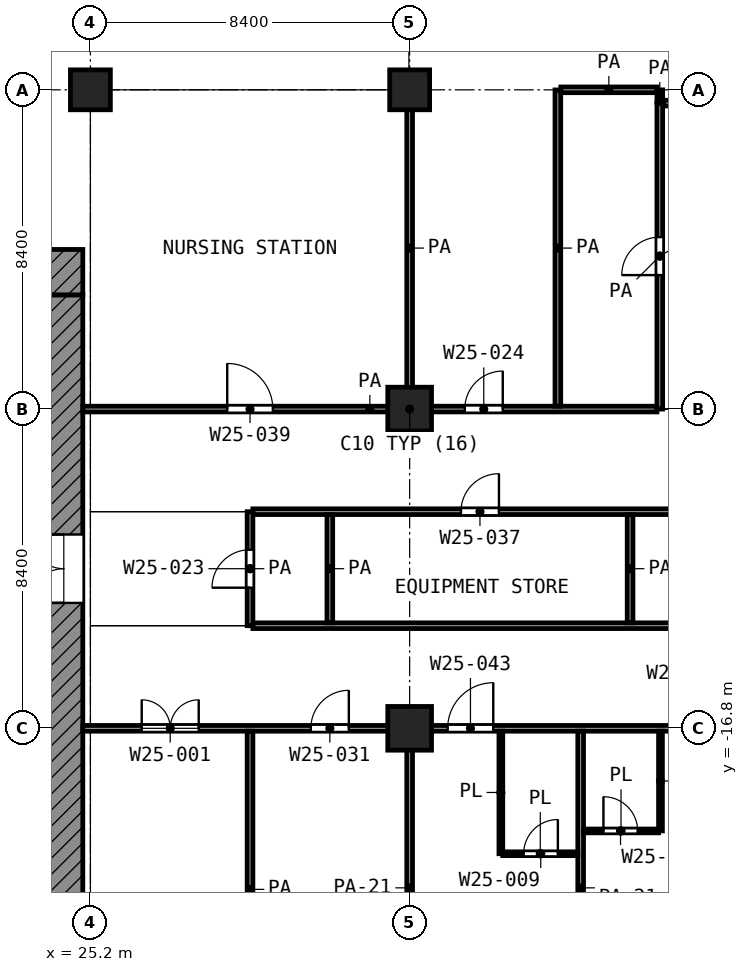
"""IFC4 building model, lengths in metres.
Left out: names, types, materials, properties, quantities, classifications, styles, units other than length and angle.
Written with IfcOpenShell. Run it as: python <this file> out.ifc"""

import sys

from ifc_helpers import new_model, si_unit, direction, frame, frame_2d, origin, origin_2d, place, context, subcontext, project, spatial, rectangle, extrude, element, fill, save


model = new_model("IFC4")
c1 = context("Model", 3, precision=1e-05, world=origin(), true_north=direction((0.0, 1.0)))
c2 = subcontext(c1, "Body", "Model", "MODEL_VIEW")
j1 = project(units=[si_unit("LENGTHUNIT", "METRE"), si_unit("PLANEANGLEUNIT", "RADIAN")], contexts=[c1])
p1 = place(None, origin())
s1 = spatial("IfcSite", under=j1, at=p1, CompositionType="ELEMENT")
p2 = place(p1, origin())
s2 = spatial("IfcBuilding", under=s1, at=p2, CompositionType="ELEMENT")
p3 = place(p2, frame((0.0, 0.0, 132.4)))
s3 = spatial("IfcBuildingStorey", under=s2, at=p3, CompositionType="ELEMENT", Elevation=132.4)
for number, where, z_axis, x_axis in (
    (1, (25.2, 0.0, 0.0), (0.0, 0.0, 1.0), (1.0, 0.0, 0.0)),
    (2, (33.6, 0.0, 0.0), (0.0, 0.0, 1.0), (1.0, 0.0, 0.0)),
):
    element("IfcColumn", number, at=place(p3, frame(where, z_axis=z_axis, x_axis=x_axis)), inside=s3, PredefinedType="COLUMN", context=c2, shape_type="SweptSolid", body=[
        extrude(rectangle(XDim=1.05, YDim=1.05, at=origin_2d()), origin(), (0.0, 0.0, 1.0), 4.2),
    ])
for number, where, z_axis, x_axis in (
    (3, (33.6, -8.4, 0.0), (0.0, 0.0, 1.0), (1.0, 0.0, 0.0)),
    (4, (33.6, -16.8, 0.0), (0.0, 0.0, 1.0), (1.0, 0.0, 0.0)),
):
    element("IfcColumn", number, at=place(p3, frame(where, z_axis=z_axis, x_axis=x_axis)), inside=s3, PredefinedType="COLUMN", context=c2, shape_type="SweptSolid", body=[
        extrude(rectangle(XDim=1.15, YDim=1.15, at=origin_2d()), origin(), (0.0, 0.0, 1.0), 4.2),
    ])
p4 = place(p3, frame((4.2, -4.8, 0.0), z_axis=(0.0, 0.0, 1.0), x_axis=(1.0, 0.0, 0.0)))
e5 = element("IfcWall", 5, at=p4, inside=s3, PredefinedType="SHEAR", context=c2, shape_type="SweptSolid", body=[
    extrude(rectangle(XDim=20.8, YDim=1.2, at=frame_2d((10.4, 0.0))), origin(), (0.0, 0.0, 1.0), 3.6),
])
p5 = place(p4, frame((1.95, 0.0, 0.0)))
e6 = element("IfcOpeningElement", 6, at=p5, cuts=e5, PredefinedType="OPENING", context=c2, shape_type="SweptSolid", body=[
    extrude(rectangle(XDim=1.1, YDim=2.1, at=frame_2d((0.55, 1.05))), frame((0.0, 0.61, 0.0), z_axis=(0.0, -1.0, 0.0), x_axis=(1.0, 0.0, 0.0)), (0.0, 0.0, 1.0), 1.22),
])
p6 = place(p4, frame((17.95, 0.0, 0.0)))
e7 = element("IfcOpeningElement", 7, at=p6, cuts=e5, PredefinedType="OPENING", context=c2, shape_type="SweptSolid", body=[
    extrude(rectangle(XDim=1.1, YDim=2.1, at=frame_2d((0.55, 1.05))), frame((0.0, 0.61, 0.0), z_axis=(0.0, -1.0, 0.0), x_axis=(1.0, 0.0, 0.0)), (0.0, 0.0, 1.0), 1.22),
])
p7 = place(p3, frame((24.5, -24.0, 0.0), z_axis=(0.0, 0.0, 1.0), x_axis=(0.0, 1.0, 0.0)))
e8 = element("IfcWall", 8, at=p7, inside=s3, PredefinedType="SHEAR", context=c2, shape_type="SweptSolid", body=[
    extrude(rectangle(XDim=18.6, YDim=1.0, at=frame_2d((9.3, 0.0))), origin(), (0.0, 0.0, 1.0), 3.6),
])
p8 = place(p7, frame((10.5, 0.0, 0.0)))
e9 = element("IfcOpeningElement", 9, at=p8, cuts=e8, PredefinedType="OPENING", context=c2, shape_type="SweptSolid", body=[
    extrude(rectangle(XDim=1.8, YDim=2.1, at=frame_2d((0.9, 1.05))), frame((0.0, 0.51, 0.0), z_axis=(0.0, -1.0, 0.0), x_axis=(1.0, 0.0, 0.0)), (0.0, 0.0, 1.0), 1.02),
])
p9 = place(p3, frame((36.05, -20.1, 0.0), z_axis=(0.0, 0.0, 1.0), x_axis=(1.0, 0.0, 0.0)))
e10 = element("IfcWall", 10, at=p9, inside=s3, PredefinedType="PARTITIONING", context=c2, shape_type="SweptSolid", body=[
    extrude(rectangle(XDim=1.975, YDim=0.1, at=frame_2d((0.987, 0.0))), origin(), (0.0, 0.0, 1.0), 3.6),
])
p10 = place(p9, frame((0.55, 0.0, 0.0)))
e11 = element("IfcOpeningElement", 11, at=p10, cuts=e10, PredefinedType="OPENING", context=c2, shape_type="SweptSolid", body=[
    extrude(rectangle(XDim=0.9, YDim=2.1, at=frame_2d((0.45, 1.05))), frame((0.0, 0.06, 0.0), z_axis=(0.0, -1.0, 0.0), x_axis=(1.0, 0.0, 0.0)), (0.0, 0.0, 1.0), 0.12),
])
p11 = place(p3, frame((38.175, -19.5, 0.0), z_axis=(0.0, 0.0, 1.0), x_axis=(1.0, 0.0, 0.0)))
e12 = element("IfcWall", 12, at=p11, inside=s3, PredefinedType="PARTITIONING", context=c2, shape_type="SweptSolid", body=[
    extrude(rectangle(XDim=1.973, YDim=0.1, at=frame_2d((0.986, 0.0))), origin(), (0.0, 0.0, 1.0), 3.6),
])
p12 = place(p11, frame((0.524, 0.0, 0.0)))
e13 = element("IfcOpeningElement", 13, at=p12, cuts=e12, PredefinedType="OPENING", context=c2, shape_type="SweptSolid", body=[
    extrude(rectangle(XDim=0.9, YDim=2.1, at=frame_2d((0.45, 1.05))), frame((0.0, 0.06, 0.0), z_axis=(0.0, -1.0, 0.0), x_axis=(1.0, 0.0, 0.0)), (0.0, 0.0, 1.0), 0.12),
])
p13 = place(p3, frame((36.0, -20.1, 0.0), z_axis=(0.0, 0.0, 1.0), x_axis=(0.0, 1.0, 0.0)))
e14 = element("IfcWall", 14, at=p13, inside=s3, PredefinedType="PARTITIONING", context=c2, shape_type="SweptSolid", body=[
    extrude(rectangle(XDim=3.225, YDim=0.1, at=frame_2d((1.613, 0.0))), origin(), (0.0, 0.0, 1.0), 3.6),
])
p14 = place(p3, frame((40.2, -19.499, 0.0), z_axis=(0.0, 0.0, 1.0), x_axis=(0.0, 1.0, 0.0)))
e15 = element("IfcWall", 15, at=p14, inside=s3, PredefinedType="PARTITIONING", context=c2, shape_type="SweptSolid", body=[
    extrude(rectangle(XDim=2.624, YDim=0.1, at=frame_2d((1.312, 0.0))), origin(), (0.0, 0.0, 1.0), 3.6),
])
p15 = place(p3, frame((25.0, -16.8, 0.0), z_axis=(0.0, 0.0, 1.0), x_axis=(1.0, 0.0, 0.0)))
e16 = element("IfcWall", 16, at=p15, inside=s3, PredefinedType="PARTITIONING", context=c2, shape_type="SweptSolid", body=[
    extrude(rectangle(XDim=50.52, YDim=0.15, at=frame_2d((25.26, 0.0))), origin(), (0.0, 0.0, 1.0), 3.6),
])
p16 = place(p15, frame((1.55, 0.0, 0.0)))
e17 = element("IfcOpeningElement", 17, at=p16, cuts=e16, PredefinedType="OPENING", context=c2, shape_type="SweptSolid", body=[
    extrude(rectangle(XDim=1.5, YDim=2.1, at=frame_2d((0.75, 1.05))), frame((0.0, 0.085, 0.0), z_axis=(0.0, -1.0, 0.0), x_axis=(1.0, 0.0, 0.0)), (0.0, 0.0, 1.0), 0.17),
])
p17 = place(p15, frame((6.0, 0.0, 0.0)))
e18 = element("IfcOpeningElement", 18, at=p17, cuts=e16, PredefinedType="OPENING", context=c2, shape_type="SweptSolid", body=[
    extrude(rectangle(XDim=1.0, YDim=2.1, at=frame_2d((0.5, 1.05))), frame((0.0, 0.085, 0.0), z_axis=(0.0, -1.0, 0.0), x_axis=(1.0, 0.0, 0.0)), (0.0, 0.0, 1.0), 0.17),
])
p18 = place(p15, frame((9.6, 0.0, 0.0)))
e19 = element("IfcOpeningElement", 19, at=p18, cuts=e16, PredefinedType="OPENING", context=c2, shape_type="SweptSolid", body=[
    extrude(rectangle(XDim=1.2, YDim=2.1, at=frame_2d((0.6, 1.05))), frame((0.0, 0.085, 0.0), z_axis=(0.0, -1.0, 0.0), x_axis=(1.0, 0.0, 0.0)), (0.0, 0.0, 1.0), 0.17),
])
p19 = place(p15, frame((18.2, 0.0, 0.0)))
e20 = element("IfcOpeningElement", 20, at=p19, cuts=e16, PredefinedType="OPENING", context=c2, shape_type="SweptSolid", body=[
    extrude(rectangle(XDim=1.2, YDim=2.1, at=frame_2d((0.6, 1.05))), frame((0.0, 0.085, 0.0), z_axis=(0.0, -1.0, 0.0), x_axis=(1.0, 0.0, 0.0)), (0.0, 0.0, 1.0), 0.17),
])
p20 = place(p15, frame((15.45, 0.0, 0.0)))
e21 = element("IfcOpeningElement", 21, at=p20, cuts=e16, PredefinedType="OPENING", context=c2, shape_type="SweptSolid", body=[
    extrude(rectangle(XDim=0.9, YDim=2.1, at=frame_2d((0.45, 1.05))), frame((0.0, 0.085, 0.0), z_axis=(0.0, -1.0, 0.0), x_axis=(1.0, 0.0, 0.0)), (0.0, 0.0, 1.0), 0.17),
])
p21 = place(p15, frame((23.6, 0.0, 0.0)))
e22 = element("IfcOpeningElement", 22, at=p21, cuts=e16, PredefinedType="OPENING", context=c2, shape_type="SweptSolid", body=[
    extrude(rectangle(XDim=1.2, YDim=2.1, at=frame_2d((0.6, 1.05))), frame((0.0, 0.085, 0.0), z_axis=(0.0, -1.0, 0.0), x_axis=(1.0, 0.0, 0.0)), (0.0, 0.0, 1.0), 0.17),
])
p22 = place(p15, frame((26.1, 0.0, 0.0)))
e23 = element("IfcOpeningElement", 23, at=p22, cuts=e16, PredefinedType="OPENING", context=c2, shape_type="SweptSolid", body=[
    extrude(rectangle(XDim=1.2, YDim=2.1, at=frame_2d((0.6, 1.05))), frame((0.0, 0.085, 0.0), z_axis=(0.0, -1.0, 0.0), x_axis=(1.0, 0.0, 0.0)), (0.0, 0.0, 1.0), 0.17),
])
p23 = place(p15, frame((32.0, 0.0, 0.0)))
e24 = element("IfcOpeningElement", 24, at=p23, cuts=e16, PredefinedType="OPENING", context=c2, shape_type="SweptSolid", body=[
    extrude(rectangle(XDim=1.2, YDim=2.1, at=frame_2d((0.6, 1.05))), frame((0.0, 0.085, 0.0), z_axis=(0.0, -1.0, 0.0), x_axis=(1.0, 0.0, 0.0)), (0.0, 0.0, 1.0), 0.17),
])
p24 = place(p15, frame((35.0, 0.0, 0.0)))
e25 = element("IfcOpeningElement", 25, at=p24, cuts=e16, PredefinedType="OPENING", context=c2, shape_type="SweptSolid", body=[
    extrude(rectangle(XDim=1.2, YDim=2.1, at=frame_2d((0.6, 1.05))), frame((0.0, 0.085, 0.0), z_axis=(0.0, -1.0, 0.0), x_axis=(1.0, 0.0, 0.0)), (0.0, 0.0, 1.0), 0.17),
])
p25 = place(p15, frame((40.4, 0.0, 0.0)))
e26 = element("IfcOpeningElement", 26, at=p25, cuts=e16, PredefinedType="OPENING", context=c2, shape_type="SweptSolid", body=[
    extrude(rectangle(XDim=1.2, YDim=2.1, at=frame_2d((0.6, 1.05))), frame((0.0, 0.085, 0.0), z_axis=(0.0, -1.0, 0.0), x_axis=(1.0, 0.0, 0.0)), (0.0, 0.0, 1.0), 0.17),
])
p26 = place(p15, frame((38.8, 0.0, 0.0)))
e27 = element("IfcOpeningElement", 27, at=p26, cuts=e16, PredefinedType="OPENING", context=c2, shape_type="SweptSolid", body=[
    extrude(rectangle(XDim=1.2, YDim=2.1, at=frame_2d((0.6, 1.05))), frame((0.0, 0.085, 0.0), z_axis=(0.0, -1.0, 0.0), x_axis=(1.0, 0.0, 0.0)), (0.0, 0.0, 1.0), 0.17),
])
p27 = place(p15, frame((47.85, 0.0, 0.0)))
e28 = element("IfcOpeningElement", 28, at=p27, cuts=e16, PredefinedType="OPENING", context=c2, shape_type="SweptSolid", body=[
    extrude(rectangle(XDim=1.0, YDim=2.1, at=frame_2d((0.5, 1.05))), frame((0.0, 0.085, 0.0), z_axis=(0.0, -1.0, 0.0), x_axis=(1.0, 0.0, 0.0)), (0.0, 0.0, 1.0), 0.17),
])
p28 = place(p3, frame((29.475, -14.1, 0.0), z_axis=(0.0, 0.0, 1.0), x_axis=(1.0, 0.0, 0.0)))
e29 = element("IfcWall", 29, at=p28, inside=s3, PredefinedType="PARTITIONING", context=c2, shape_type="SweptSolid", body=[
    extrude(rectangle(XDim=43.35, YDim=0.15, at=frame_2d((21.675, 0.0))), origin(), (0.0, 0.0, 1.0), 3.6),
])
p29 = place(p28, frame((20.425, 0.0, 0.0)))
e30 = element("IfcOpeningElement", 30, at=p29, cuts=e29, PredefinedType="OPENING", context=c2, shape_type="SweptSolid", body=[
    extrude(rectangle(XDim=1.0, YDim=2.1, at=frame_2d((0.5, 1.05))), frame((0.0, 0.085, 0.0), z_axis=(0.0, -1.0, 0.0), x_axis=(1.0, 0.0, 0.0)), (0.0, 0.0, 1.0), 0.17),
])
p30 = place(p3, frame((29.475, -11.1, 0.0), z_axis=(0.0, 0.0, 1.0), x_axis=(1.0, 0.0, 0.0)))
e31 = element("IfcWall", 31, at=p30, inside=s3, PredefinedType="PARTITIONING", context=c2, shape_type="SweptSolid", body=[
    extrude(rectangle(XDim=43.35, YDim=0.15, at=frame_2d((21.675, 0.0))), origin(), (0.0, 0.0, 1.0), 3.6),
])
p31 = place(p30, frame((28.675, 0.0, 0.0)))
e32 = element("IfcOpeningElement", 32, at=p31, cuts=e31, PredefinedType="OPENING", context=c2, shape_type="SweptSolid", body=[
    extrude(rectangle(XDim=1.0, YDim=2.1, at=frame_2d((0.5, 1.05))), frame((0.0, 0.085, 0.0), z_axis=(0.0, -1.0, 0.0), x_axis=(1.0, 0.0, 0.0)), (0.0, 0.0, 1.0), 0.17),
])
p32 = place(p30, frame((34.875, 0.0, 0.0)))
e33 = element("IfcOpeningElement", 33, at=p32, cuts=e31, PredefinedType="OPENING", context=c2, shape_type="SweptSolid", body=[
    extrude(rectangle(XDim=0.9, YDim=2.1, at=frame_2d((0.45, 1.05))), frame((0.0, 0.085, 0.0), z_axis=(0.0, -1.0, 0.0), x_axis=(1.0, 0.0, 0.0)), (0.0, 0.0, 1.0), 0.17),
])
p33 = place(p30, frame((40.075, 0.0, 0.0)))
e34 = element("IfcOpeningElement", 34, at=p33, cuts=e31, PredefinedType="OPENING", context=c2, shape_type="SweptSolid", body=[
    extrude(rectangle(XDim=1.0, YDim=2.1, at=frame_2d((0.5, 1.05))), frame((0.0, 0.085, 0.0), z_axis=(0.0, -1.0, 0.0), x_axis=(1.0, 0.0, 0.0)), (0.0, 0.0, 1.0), 0.17),
])
p34 = place(p30, frame((5.475, 0.0, 0.0)))
e35 = element("IfcOpeningElement", 35, at=p34, cuts=e31, PredefinedType="OPENING", context=c2, shape_type="SweptSolid", body=[
    extrude(rectangle(XDim=1.0, YDim=2.1, at=frame_2d((0.5, 1.05))), frame((0.0, 0.085, 0.0), z_axis=(0.0, -1.0, 0.0), x_axis=(1.0, 0.0, 0.0)), (0.0, 0.0, 1.0), 0.17),
])
p35 = place(p30, frame((12.675, 0.0, 0.0)))
e36 = element("IfcOpeningElement", 36, at=p35, cuts=e31, PredefinedType="OPENING", context=c2, shape_type="SweptSolid", body=[
    extrude(rectangle(XDim=1.0, YDim=2.1, at=frame_2d((0.5, 1.05))), frame((0.0, 0.085, 0.0), z_axis=(0.0, -1.0, 0.0), x_axis=(1.0, 0.0, 0.0)), (0.0, 0.0, 1.0), 0.17),
])
p36 = place(p3, frame((25.0, -8.4, 0.0), z_axis=(0.0, 0.0, 1.0), x_axis=(1.0, 0.0, 0.0)))
e37 = element("IfcWall", 37, at=p36, inside=s3, PredefinedType="PARTITIONING", context=c2, shape_type="SweptSolid", body=[
    extrude(rectangle(XDim=15.107, YDim=0.15, at=frame_2d((7.553, 0.0))), origin(), (0.0, 0.0, 1.0), 3.6),
])
p37 = place(p36, frame((3.8, 0.0, 0.0)))
e38 = element("IfcOpeningElement", 38, at=p37, cuts=e37, PredefinedType="OPENING", context=c2, shape_type="SweptSolid", body=[
    extrude(rectangle(XDim=1.2, YDim=2.1, at=frame_2d((0.6, 1.05))), frame((0.0, 0.085, 0.0), z_axis=(0.0, -1.0, 0.0), x_axis=(1.0, 0.0, 0.0)), (0.0, 0.0, 1.0), 0.17),
])
p38 = place(p36, frame((10.05, 0.0, 0.0)))
e39 = element("IfcOpeningElement", 39, at=p38, cuts=e37, PredefinedType="OPENING", context=c2, shape_type="SweptSolid", body=[
    extrude(rectangle(XDim=1.0, YDim=2.1, at=frame_2d((0.5, 1.05))), frame((0.0, 0.085, 0.0), z_axis=(0.0, -1.0, 0.0), x_axis=(1.0, 0.0, 0.0)), (0.0, 0.0, 1.0), 0.17),
])
p39 = place(p3, frame((40.277, -0.35, 0.0), z_axis=(0.0, 0.0, 1.0), x_axis=(1.0, 0.0, 0.0)))
e40 = element("IfcWall", 40, at=p39, inside=s3, PredefinedType="PARTITIONING", context=c2, shape_type="SweptSolid", body=[
    extrude(rectangle(XDim=1.211, YDim=0.15, at=frame_2d((0.605, 0.0))), origin(), (0.0, 0.0, 1.0), 3.6),
])
p40 = place(p3, frame((37.578, 0.0, 0.0), z_axis=(0.0, 0.0, 1.0), x_axis=(1.0, 0.0, 0.0)))
e41 = element("IfcWall", 41, at=p40, inside=s3, PredefinedType="PARTITIONING", context=c2, shape_type="SweptSolid", body=[
    extrude(rectangle(XDim=2.527, YDim=0.15, at=frame_2d((1.264, 0.0))), origin(), (0.0, 0.0, 1.0), 3.6),
])
p41 = place(p3, frame((29.4, -25.2, 0.0), z_axis=(0.0, 0.0, 1.0), x_axis=(0.0, 1.0, 0.0)))
e42 = element("IfcWall", 42, at=p41, inside=s3, PredefinedType="PARTITIONING", context=c2, shape_type="SweptSolid", body=[
    extrude(rectangle(XDim=8.325, YDim=0.15, at=frame_2d((4.163, 0.0))), origin(), (0.0, 0.0, 1.0), 3.6),
])
p42 = place(p3, frame((29.4, -14.1, 0.0), z_axis=(0.0, 0.0, 1.0), x_axis=(0.0, 1.0, 0.0)))
e43 = element("IfcWall", 43, at=p42, inside=s3, PredefinedType="PARTITIONING", context=c2, shape_type="SweptSolid", body=[
    extrude(rectangle(XDim=3.0, YDim=0.15, at=frame_2d((1.5, 0.0))), origin(), (0.0, 0.0, 1.0), 3.6),
])
p43 = place(p42, frame((1.0, 0.0, 0.0)))
e44 = element("IfcOpeningElement", 44, at=p43, cuts=e43, PredefinedType="OPENING", context=c2, shape_type="SweptSolid", body=[
    extrude(rectangle(XDim=1.0, YDim=2.1, at=frame_2d((0.5, 1.05))), frame((0.0, 0.085, 0.0), z_axis=(0.0, -1.0, 0.0), x_axis=(1.0, 0.0, 0.0)), (0.0, 0.0, 1.0), 0.17),
])
p44 = place(p3, frame((31.5, -14.025, 0.0), z_axis=(0.0, 0.0, 1.0), x_axis=(0.0, 1.0, 0.0)))
e45 = element("IfcWall", 45, at=p44, inside=s3, PredefinedType="PARTITIONING", context=c2, shape_type="SweptSolid", body=[
    extrude(rectangle(XDim=2.85, YDim=0.15, at=frame_2d((1.425, 0.0))), origin(), (0.0, 0.0, 1.0), 3.6),
])
p45 = place(p3, frame((33.6, -25.12, 0.0), z_axis=(0.0, 0.0, 1.0), x_axis=(0.0, 1.0, 0.0)))
e46 = element("IfcWall", 46, at=p45, inside=s3, PredefinedType="PARTITIONING", context=c2, shape_type="SweptSolid", body=[
    extrude(rectangle(XDim=8.245, YDim=0.15, at=frame_2d((4.123, 0.0))), origin(), (0.0, 0.0, 1.0), 2.7),
])
for number, where, z_axis, x_axis in (
    (47, (33.6, -8.325, 0.0), (0.0, 0.0, 1.0), (0.0, 1.0, 0.0)),
    (48, (37.5, -8.325, 0.0), (0.0, 0.0, 1.0), (0.0, 1.0, 0.0)),
):
    element("IfcWall", number, at=place(p3, frame(where, z_axis=z_axis, x_axis=x_axis)), inside=s3, PredefinedType="PARTITIONING", context=c2, shape_type="SweptSolid", body=[
        extrude(rectangle(XDim=8.322, YDim=0.15, at=frame_2d((4.161, 0.0))), origin(), (0.0, 0.0, 1.0), 3.6),
    ])
p46 = place(p3, frame((38.1, -25.12, 0.0), z_axis=(0.0, 0.0, 1.0), x_axis=(0.0, 1.0, 0.0)))
e49 = element("IfcWall", 49, at=p46, inside=s3, PredefinedType="PARTITIONING", context=c2, shape_type="SweptSolid", body=[
    extrude(rectangle(XDim=8.245, YDim=0.15, at=frame_2d((4.123, 0.0))), origin(), (0.0, 0.0, 1.0), 2.7),
])
p47 = place(p3, frame((39.4, -14.025, 0.0), z_axis=(0.0, 0.0, 1.0), x_axis=(0.0, 1.0, 0.0)))
e50 = element("IfcWall", 50, at=p47, inside=s3, PredefinedType="PARTITIONING", context=c2, shape_type="SweptSolid", body=[
    extrude(rectangle(XDim=2.85, YDim=0.15, at=frame_2d((1.425, 0.0))), origin(), (0.0, 0.0, 1.0), 3.6),
])
p48 = place(p3, frame((40.182, -8.4, 0.0), z_axis=(0.0, 0.0, 1.0), x_axis=(0.0, 1.0, 0.0)))
e51 = element("IfcWall", 51, at=p48, inside=s3, PredefinedType="PARTITIONING", context=c2, shape_type="SweptSolid", body=[
    extrude(rectangle(XDim=8.05, YDim=0.15, at=frame_2d((4.025, 0.0))), origin(), (0.0, 0.0, 1.0), 3.6),
])
p49 = place(p48, frame((3.525, 0.0, 0.0)))
e52 = element("IfcOpeningElement", 52, at=p49, cuts=e51, PredefinedType="OPENING", context=c2, shape_type="SweptSolid", body=[
    extrude(rectangle(XDim=1.0, YDim=2.1, at=frame_2d((0.5, 1.05))), frame((0.0, 0.085, 0.0), z_axis=(0.0, -1.0, 0.0), x_axis=(1.0, 0.0, 0.0)), (0.0, 0.0, 1.0), 0.17),
])
p50 = place(p3, frame((40.182, -0.33, 0.0), z_axis=(0.0, 0.0, 1.0), x_axis=(0.0, 1.0, 0.0)))
e53 = element("IfcWall", 53, at=p50, inside=s3, PredefinedType="PARTITIONING", context=c2, shape_type="SweptSolid", body=[
    extrude(rectangle(XDim=0.328, YDim=0.15, at=frame_2d((0.164, 0.0))), origin(), (0.0, 0.0, 1.0), 3.6),
])
p51 = place(p8, origin())
e54 = element("IfcDoor", 54, at=p51, inside=s3, OperationType="DOUBLE_DOOR_SINGLE_SWING", PredefinedType="DOOR", context=c2, shape_type="SweptSolid", body=[
    extrude(rectangle(XDim=1.8, YDim=2.1, at=frame_2d((0.9, 1.05))), frame((0.0, 0.025, 0.0), z_axis=(0.0, -1.0, 0.0), x_axis=(1.0, 0.0, 0.0)), (0.0, 0.0, 1.0), 0.05),
])
fill(e9, e54)
p52 = place(p16, origin())
e55 = element("IfcDoor", 55, at=p52, inside=s3, OperationType="DOUBLE_DOOR_SINGLE_SWING", PredefinedType="DOOR", context=c2, shape_type="SweptSolid", body=[
    extrude(rectangle(XDim=1.5, YDim=2.1, at=frame_2d((0.75, 1.05))), frame((0.0, 0.025, 0.0), z_axis=(0.0, -1.0, 0.0), x_axis=(1.0, 0.0, 0.0)), (0.0, 0.0, 1.0), 0.05),
])
fill(e17, e55)
p53 = place(p37, origin())
e56 = element("IfcDoor", 56, at=p53, inside=s3, OperationType="SINGLE_SWING_LEFT", PredefinedType="DOOR", context=c2, shape_type="SweptSolid", body=[
    extrude(rectangle(XDim=1.2, YDim=2.1, at=frame_2d((0.6, 1.05))), frame((0.0, 0.025, 0.0), z_axis=(0.0, -1.0, 0.0), x_axis=(1.0, 0.0, 0.0)), (0.0, 0.0, 1.0), 0.05),
])
fill(e38, e56)
p54 = place(p38, origin())
e57 = element("IfcDoor", 57, at=p54, inside=s3, OperationType="SINGLE_SWING_RIGHT", PredefinedType="DOOR", context=c2, shape_type="SweptSolid", body=[
    extrude(rectangle(XDim=1.0, YDim=2.1, at=frame_2d((0.5, 1.05))), frame((0.0, 0.025, 0.0), z_axis=(0.0, -1.0, 0.0), x_axis=(1.0, 0.0, 0.0)), (0.0, 0.0, 1.0), 0.05),
])
fill(e39, e57)
p55 = place(p49, origin())
e58 = element("IfcDoor", 58, at=p55, inside=s3, OperationType="SINGLE_SWING_LEFT", PredefinedType="DOOR", context=c2, shape_type="SweptSolid", body=[
    extrude(rectangle(XDim=1.0, YDim=2.1, at=frame_2d((0.5, 1.05))), frame((0.0, 0.025, 0.0), z_axis=(0.0, -1.0, 0.0), x_axis=(1.0, 0.0, 0.0)), (0.0, 0.0, 1.0), 0.05),
])
fill(e52, e58)
p56 = place(p17, origin())
e59 = element("IfcDoor", 59, at=p56, inside=s3, OperationType="SINGLE_SWING_RIGHT", PredefinedType="DOOR", context=c2, shape_type="SweptSolid", body=[
    extrude(rectangle(XDim=1.0, YDim=2.1, at=frame_2d((0.5, 1.05))), frame((0.0, 0.025, 0.0), z_axis=(0.0, -1.0, 0.0), x_axis=(1.0, 0.0, 0.0)), (0.0, 0.0, 1.0), 0.05),
])
fill(e18, e59)
p57 = place(p18, origin())
e60 = element("IfcDoor", 60, at=p57, inside=s3, OperationType="SINGLE_SWING_RIGHT", PredefinedType="DOOR", context=c2, shape_type="SweptSolid", body=[
    extrude(rectangle(XDim=1.2, YDim=2.1, at=frame_2d((0.6, 1.05))), frame((0.0, 0.025, 0.0), z_axis=(0.0, -1.0, 0.0), x_axis=(1.0, 0.0, 0.0)), (0.0, 0.0, 1.0), 0.05),
])
fill(e19, e60)
p58 = place(p10, origin())
e61 = element("IfcDoor", 61, at=p58, inside=s3, OperationType="SINGLE_SWING_RIGHT", PredefinedType="DOOR", context=c2, shape_type="SweptSolid", body=[
    extrude(rectangle(XDim=0.9, YDim=2.1, at=frame_2d((0.45, 1.05))), frame((0.0, 0.025, 0.0), z_axis=(0.0, -1.0, 0.0), x_axis=(1.0, 0.0, 0.0)), (0.0, 0.0, 1.0), 0.05),
])
fill(e11, e61)
p59 = place(p12, origin())
e62 = element("IfcDoor", 62, at=p59, inside=s3, OperationType="SINGLE_SWING_LEFT", PredefinedType="DOOR", context=c2, shape_type="SweptSolid", body=[
    extrude(rectangle(XDim=0.9, YDim=2.1, at=frame_2d((0.45, 1.05))), frame((0.0, 0.025, 0.0), z_axis=(0.0, -1.0, 0.0), x_axis=(1.0, 0.0, 0.0)), (0.0, 0.0, 1.0), 0.05),
])
fill(e13, e62)
p60 = place(p43, origin())
e63 = element("IfcDoor", 63, at=p60, inside=s3, OperationType="SINGLE_SWING_LEFT", PredefinedType="DOOR", context=c2, shape_type="SweptSolid", body=[
    extrude(rectangle(XDim=1.0, YDim=2.1, at=frame_2d((0.5, 1.05))), frame((0.0, 0.025, 0.0), z_axis=(0.0, -1.0, 0.0), x_axis=(1.0, 0.0, 0.0)), (0.0, 0.0, 1.0), 0.05),
])
fill(e44, e63)
p61 = place(p34, origin())
e64 = element("IfcDoor", 64, at=p61, inside=s3, OperationType="SINGLE_SWING_RIGHT", PredefinedType="DOOR", context=c2, shape_type="SweptSolid", body=[
    extrude(rectangle(XDim=1.0, YDim=2.1, at=frame_2d((0.5, 1.05))), frame((0.0, 0.025, 0.0), z_axis=(0.0, -1.0, 0.0), x_axis=(1.0, 0.0, 0.0)), (0.0, 0.0, 1.0), 0.05),
])
fill(e35, e64)
save(model, sys.argv[1])
